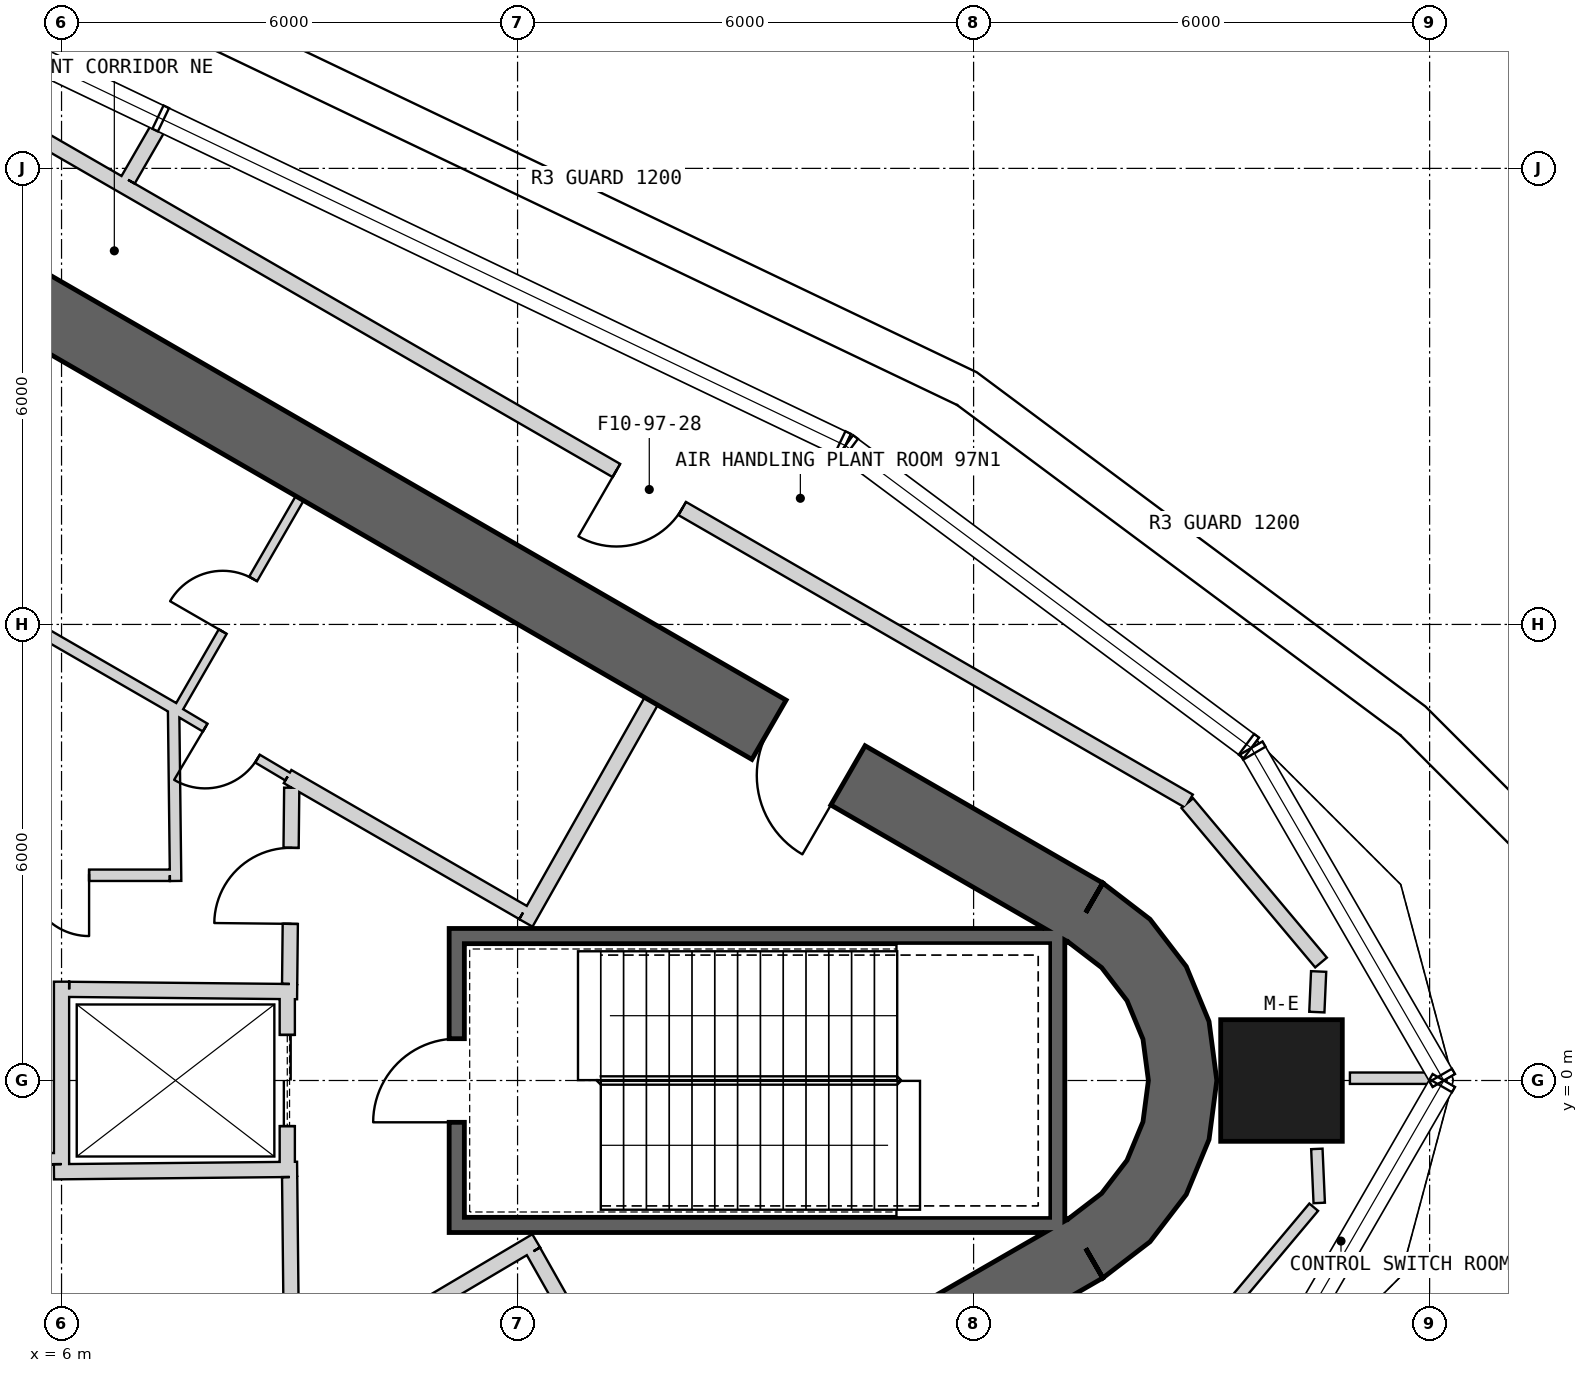
"""IFC4 building model, lengths in metres.
Left out: names, types, materials, properties, quantities, classifications, styles, units other than length and angle.
Written with IfcOpenShell. Run it as: python <this file> out.ifc"""

import sys

from ifc_helpers import new_model, si_unit, direction, frame, frame_2d, origin, origin_2d, place, context, subcontext, project, spatial, polyline, rectangle, outline, extrude, element, fill, save


model = new_model("IFC4")
c1 = context("Model", 3, precision=1e-05, world=origin(), true_north=direction((0.0, 1.0)))
c2 = subcontext(c1, "Body", "Model", "MODEL_VIEW")
j1 = project(units=[si_unit("LENGTHUNIT", "METRE"), si_unit("PLANEANGLEUNIT", "RADIAN")], contexts=[c1])
p1 = place(None, origin())
s1 = spatial("IfcSite", under=j1, at=p1, CompositionType="ELEMENT")
p2 = place(p1, origin())
s2 = spatial("IfcBuilding", under=s1, at=p2, CompositionType="ELEMENT")
p3 = place(p2, frame((0.0, 0.0, 430.3)))
s3 = spatial("IfcBuildingStorey", under=s2, at=p3, CompositionType="ELEMENT", Elevation=430.3)
p4 = place(p3, frame((22.051, 0.0, 0.0), z_axis=(0.0, 0.0, 1.0), x_axis=(1.0, 0.0, 0.0)))
e1 = element("IfcColumn", 1, at=p4, inside=s3, PredefinedType="COLUMN", context=c2, shape_type="SweptSolid", body=[
    extrude(rectangle(XDim=1.6, YDim=1.6, at=origin_2d()), origin(), (0.0, 0.0, 1.0), 5.0),
])
p5 = place(p3, frame((19.475, 2.208, 0.0), z_axis=(0.0, 0.0, 1.0), x_axis=(-0.866028369851, 0.499994862586, 0.0)))
e2 = element("IfcWall", 2, at=p5, inside=s3, PredefinedType="SHEAR", context=c2, shape_type="SweptSolid", body=[
    extrude(rectangle(XDim=31.523, YDim=0.9, at=frame_2d((15.762, 0.0))), origin(), (0.0, 0.0, 1.0), 5.0),
])
p6 = place(p5, frame((3.612, 0.0, 0.0)))
e3 = element("IfcOpeningElement", 3, at=p6, cuts=e2, PredefinedType="OPENING", context=c2, shape_type="SweptSolid", body=[
    extrude(rectangle(XDim=1.2, YDim=2.4, at=frame_2d((0.6, 1.2))), frame((0.0, 0.46, 0.0), z_axis=(0.0, -1.0, 0.0), x_axis=(1.0, 0.0, 0.0)), (0.0, 0.0, 1.0), 0.92),
])
p7 = place(p5, frame((26.712, 0.0, 0.0)))
e4 = element("IfcOpeningElement", 4, at=p7, cuts=e2, PredefinedType="OPENING", context=c2, shape_type="SweptSolid", body=[
    extrude(rectangle(XDim=1.2, YDim=2.4, at=frame_2d((0.6, 1.2))), frame((0.0, 0.46, 0.0), z_axis=(0.0, -1.0, 0.0), x_axis=(1.0, 0.0, 0.0)), (0.0, 0.0, 1.0), 0.92),
])
p8 = place(p3, frame((-7.825, -17.97, 0.0), z_axis=(0.0, 0.0, 1.0), x_axis=(0.866028369851, 0.499994862586, 0.0)))
e5 = element("IfcWall", 5, at=p8, inside=s3, PredefinedType="SHEAR", context=c2, shape_type="SweptSolid", body=[
    extrude(rectangle(XDim=31.523, YDim=0.9, at=frame_2d((15.762, 0.0))), origin(), (0.0, 0.0, 1.0), 5.0),
])
p9 = place(p8, frame((17.862, 0.0, 0.0)))
e6 = element("IfcOpeningElement", 6, at=p9, cuts=e5, PredefinedType="OPENING", context=c2, shape_type="SweptSolid", body=[
    extrude(rectangle(XDim=1.2, YDim=2.4, at=frame_2d((0.6, 1.2))), frame((0.0, 0.46, 0.0), z_axis=(0.0, -1.0, 0.0), x_axis=(1.0, 0.0, 0.0)), (0.0, 0.0, 1.0), 0.92),
])
p10 = place(p8, frame((20.562, 0.0, 0.0)))
e7 = element("IfcOpeningElement", 7, at=p10, cuts=e5, PredefinedType="OPENING", context=c2, shape_type="SweptSolid", body=[
    extrude(rectangle(XDim=1.2, YDim=2.4, at=frame_2d((0.6, 1.2))), frame((0.0, 0.46, 0.0), z_axis=(0.0, -1.0, 0.0), x_axis=(1.0, 0.0, 0.0)), (0.0, 0.0, 1.0), 0.92),
])
p11 = place(p8, frame((26.712, 0.0, 0.0)))
e8 = element("IfcOpeningElement", 8, at=p11, cuts=e5, PredefinedType="OPENING", context=c2, shape_type="SweptSolid", body=[
    extrude(rectangle(XDim=1.2, YDim=2.4, at=frame_2d((0.6, 1.2))), frame((0.0, 0.46, 0.0), z_axis=(0.0, -1.0, 0.0), x_axis=(1.0, 0.0, 0.0)), (0.0, 0.0, 1.0), 0.92),
])
p12 = place(p8, frame((3.612, 0.0, 0.0)))
e9 = element("IfcOpeningElement", 9, at=p12, cuts=e5, PredefinedType="OPENING", context=c2, shape_type="SweptSolid", body=[
    extrude(rectangle(XDim=1.2, YDim=2.4, at=frame_2d((0.6, 1.2))), frame((0.0, 0.46, 0.0), z_axis=(0.0, -1.0, 0.0), x_axis=(1.0, 0.0, 0.0)), (0.0, 0.0, 1.0), 0.92),
])
p13 = place(p3, origin())
e10 = element("IfcWall", 10, at=p13, inside=s3, PredefinedType="SHEAR", context=c2, shape_type="SweptSolid", body=[
    extrude(outline(polyline([(19.7, -2.598), (20.321, -2.121), (20.798, -1.5), (21.098, -0.777), (21.2, 0.0), (21.098, 0.777), (20.798, 1.5), (20.321, 2.121), (19.7, 2.598), (19.25, 1.819), (19.685, 1.485), (20.019, 1.05), (20.229, 0.543), (20.3, 0.0), (20.229, -0.543), (20.019, -1.05), (19.685, -1.485), (19.25, -1.819), (19.7, -2.598)])), origin(), (0.0, 0.0, 1.0), 5.0),
])
p14 = place(p3, frame((19.2, 1.9, -0.25), z_axis=(0.0, 0.0, 1.0), x_axis=(-1.0, 0.0, 0.0)))
e11 = element("IfcWall", 11, at=p14, inside=s3, PredefinedType="SHEAR", context=c2, shape_type="SweptSolid", body=[
    extrude(rectangle(XDim=8.1, YDim=0.2, at=frame_2d((4.05, 0.0))), origin(), (0.0, 0.0, 1.0), 5.0),
])
p15 = place(p3, frame((19.1, -2.0, -0.25), z_axis=(0.0, 0.0, 1.0), x_axis=(0.0, 1.0, 0.0)))
e12 = element("IfcWall", 12, at=p15, inside=s3, PredefinedType="SHEAR", context=c2, shape_type="SweptSolid", body=[
    extrude(rectangle(XDim=3.8, YDim=0.2, at=frame_2d((1.9, 0.0))), origin(), (0.0, 0.0, 1.0), 5.0),
])
p16 = place(p3, frame((11.1, -1.9, -0.25), z_axis=(0.0, 0.0, 1.0), x_axis=(1.0, 0.0, 0.0)))
e13 = element("IfcWall", 13, at=p16, inside=s3, PredefinedType="SHEAR", context=c2, shape_type="SweptSolid", body=[
    extrude(rectangle(XDim=7.9, YDim=0.2, at=frame_2d((3.95, 0.0))), origin(), (0.0, 0.0, 1.0), 5.0),
])
p17 = place(p3, frame((11.2, -1.8, -0.25), z_axis=(0.0, 0.0, 1.0), x_axis=(0.0, 1.0, 0.0)))
e14 = element("IfcWall", 14, at=p17, inside=s3, PredefinedType="SHEAR", context=c2, shape_type="SweptSolid", body=[
    extrude(rectangle(XDim=3.6, YDim=0.2, at=frame_2d((1.8, 0.0))), origin(), (0.0, 0.0, 1.0), 5.0),
])
p18 = place(p17, frame((1.25, 0.0, 0.25)))
e15 = element("IfcOpeningElement", 15, at=p18, cuts=e14, PredefinedType="OPENING", context=c2, shape_type="SweptSolid", body=[
    extrude(rectangle(XDim=1.1, YDim=2.1, at=frame_2d((0.55, 1.05))), frame((0.0, 0.11, 0.0), z_axis=(0.0, -1.0, 0.0), x_axis=(1.0, 0.0, 0.0)), (0.0, 0.0, 1.0), 0.22),
])
p19 = place(p3, frame((8.97, 1.2, 0.0), z_axis=(0.0, 0.0, 1.0), x_axis=(0.0, -1.0, 0.0)))
e16 = element("IfcWall", 16, at=p19, inside=s3, PredefinedType="PLUMBINGWALL", context=c2, shape_type="SweptSolid", body=[
    extrude(rectangle(XDim=2.4, YDim=0.2, at=frame_2d((1.2, 0.0))), origin(), (0.0, 0.0, 1.0), 4.75),
])
p20 = place(p19, frame((0.6, 0.0, 0.0)))
e17 = element("IfcOpeningElement", 17, at=p20, cuts=e16, PredefinedType="OPENING", context=c2, shape_type="SweptSolid", body=[
    extrude(rectangle(XDim=1.2, YDim=2.4, at=frame_2d((0.6, 1.2))), frame((0.0, 0.11, 0.0), z_axis=(0.0, -1.0, 0.0), x_axis=(1.0, 0.0, 0.0)), (0.0, 0.0, 1.0), 0.22),
])
p21 = place(p3, frame((9.1, -1.169, 0.0), z_axis=(0.0, 0.0, 1.0), x_axis=(-0.999950064753, -0.009993397809, 0.0)))
e18 = element("IfcWall", 18, at=p21, inside=s3, PredefinedType="PLUMBINGWALL", context=c2, shape_type="SweptSolid", body=[
    extrude(rectangle(XDim=3.2, YDim=0.2, at=frame_2d((1.6, 0.0))), origin(), (0.0, 0.0, 1.0), 4.75),
])
p22 = place(p3, frame((6.0, -1.1, 0.0), z_axis=(0.0, 0.0, 1.0), x_axis=(0.0, 1.0, 0.0)))
e19 = element("IfcWall", 19, at=p22, inside=s3, PredefinedType="PLUMBINGWALL", context=c2, shape_type="SweptSolid", body=[
    extrude(rectangle(XDim=2.4, YDim=0.2, at=frame_2d((1.2, 0.0))), origin(), (0.0, 0.0, 1.0), 4.75),
])
p23 = place(p3, frame((9.1, 1.169, 0.0), z_axis=(0.0, 0.0, 1.0), x_axis=(-0.99994990606, 0.010009264196, 0.0)))
e20 = element("IfcWall", 20, at=p23, inside=s3, PredefinedType="PLUMBINGWALL", context=c2, shape_type="SweptSolid", body=[
    extrude(rectangle(XDim=3.0, YDim=0.2, at=frame_2d((1.5, 0.0))), origin(), (0.0, 0.0, 1.0), 4.75),
])
p24 = place(p3, frame((7.508, 4.845, 0.0), z_axis=(0.0, 0.0, 1.0), x_axis=(0.500017246033, 0.866015446554, 0.0)))
e21 = element("IfcWall", 21, at=p24, inside=s3, PredefinedType="PARTITIONING", context=c2, shape_type="SweptSolid", body=[
    extrude(rectangle(XDim=3.25, YDim=0.12, at=frame_2d((1.625, 0.0))), origin(), (0.0, 0.0, 1.0), 4.75),
])
p25 = place(p24, frame((1.225, 0.0, 0.0)))
e22 = element("IfcOpeningElement", 22, at=p25, cuts=e21, PredefinedType="OPENING", context=c2, shape_type="SweptSolid", body=[
    extrude(rectangle(XDim=0.8, YDim=2.1, at=frame_2d((0.4, 1.05))), frame((0.0, 0.07, 0.0), z_axis=(0.0, -1.0, 0.0), x_axis=(1.0, 0.0, 0.0)), (0.0, 0.0, 1.0), 0.14),
])
p26 = place(p3, frame((12.11, 2.073, 0.0), z_axis=(0.0, 0.0, 1.0), x_axis=(0.49196600604, 0.870614408852, 0.0)))
e23 = element("IfcWall", 23, at=p26, inside=s3, PredefinedType="PARTITIONING", context=c2, shape_type="SweptSolid", body=[
    extrude(rectangle(XDim=3.35, YDim=0.2, at=frame_2d((1.675, 0.0))), origin(), (0.0, 0.0, 1.0), 4.75),
])
p27 = place(p3, frame((8.974, 3.999, 0.0), z_axis=(0.0, 0.0, 1.0), x_axis=(0.86601284211, -0.500021756827, 0.0)))
e24 = element("IfcWall", 24, at=p27, inside=s3, PredefinedType="PARTITIONING", context=c2, shape_type="SweptSolid", body=[
    extrude(rectangle(XDim=3.577, YDim=0.2, at=frame_2d((1.789, 0.0))), origin(), (0.0, 0.0, 1.0), 4.75),
])
p28 = place(p3, frame((7.493, 4.878, 0.0), z_axis=(0.0, 0.0, 1.0), x_axis=(0.859934455514, -0.510404479035, 0.0)))
e25 = element("IfcWall", 25, at=p28, inside=s3, PredefinedType="PARTITIONING", context=c2, shape_type="SweptSolid", body=[
    extrude(rectangle(XDim=1.722, YDim=0.12, at=frame_2d((0.861, 0.0))), origin(), (0.0, 0.0, 1.0), 4.75),
])
p29 = place(p28, frame((0.461, 0.0, 0.0)))
e26 = element("IfcOpeningElement", 26, at=p29, cuts=e25, PredefinedType="OPENING", context=c2, shape_type="SweptSolid", body=[
    extrude(rectangle(XDim=0.8, YDim=2.1, at=frame_2d((0.4, 1.05))), frame((0.0, 0.07, 0.0), z_axis=(0.0, -1.0, 0.0), x_axis=(1.0, 0.0, 0.0)), (0.0, 0.0, 1.0), 0.14),
])
p30 = place(p3, frame((7.497, 4.886, 0.0), z_axis=(0.0, 0.0, 1.0), x_axis=(-0.866030989016, 0.499990325971, 0.0)))
e27 = element("IfcWall", 27, at=p30, inside=s3, PredefinedType="PLUMBINGWALL", context=c2, shape_type="SweptSolid", body=[
    extrude(rectangle(XDim=8.1, YDim=0.15, at=frame_2d((4.05, 0.0))), origin(), (0.0, 0.0, 1.0), 4.75),
])
p31 = place(p3, frame((12.245, -2.109, 0.0), z_axis=(0.0, 0.0, 1.0), x_axis=(-0.860414880418, -0.509594185166, 0.0)))
e28 = element("IfcWall", 28, at=p31, inside=s3, PredefinedType="PARTITIONING", context=c2, shape_type="SweptSolid", body=[
    extrude(rectangle(XDim=2.7, YDim=0.2, at=frame_2d((1.35, 0.0))), origin(), (0.0, 0.0, 1.0), 4.75),
])
p32 = place(p3, frame((13.758, -4.99, 0.0), z_axis=(0.0, 0.0, 1.0), x_axis=(-0.491993409184, 0.87059892334, 0.0)))
e29 = element("IfcWall", 29, at=p32, inside=s3, PredefinedType="PARTITIONING", context=c2, shape_type="SweptSolid", body=[
    extrude(rectangle(XDim=3.15, YDim=0.2, at=frame_2d((1.575, 0.0))), origin(), (0.0, 0.0, 1.0), 4.75),
])
p33 = place(p32, frame((1.175, 0.0, 0.0)))
e30 = element("IfcOpeningElement", 30, at=p33, cuts=e29, PredefinedType="OPENING", context=c2, shape_type="SweptSolid", body=[
    extrude(rectangle(XDim=0.8, YDim=2.1, at=frame_2d((0.4, 1.05))), frame((0.0, 0.11, 0.0), z_axis=(0.0, -1.0, 0.0), x_axis=(1.0, 0.0, 0.0)), (0.0, 0.0, 1.0), 0.22),
])
p34 = place(p3, frame((9.029, -3.851, 0.0), z_axis=(0.0, 0.0, 1.0), x_axis=(-0.010784614026, 0.999941844359, 0.0)))
e31 = element("IfcWall", 31, at=p34, inside=s3, PredefinedType="PARTITIONING", context=c2, shape_type="SweptSolid", body=[
    extrude(rectangle(XDim=2.581, YDim=0.2, at=frame_2d((1.291, 0.0))), origin(), (0.0, 0.0, 1.0), 4.75),
])
p35 = place(p3, frame((9.001, 1.27, 0.0), z_axis=(0.0, 0.0, 1.0), x_axis=(0.010780534828, 0.999941888346, 0.0)))
e32 = element("IfcWall", 32, at=p35, inside=s3, PredefinedType="PARTITIONING", context=c2, shape_type="SweptSolid", body=[
    extrude(rectangle(XDim=2.582, YDim=0.2, at=frame_2d((1.291, 0.0))), origin(), (0.0, 0.0, 1.0), 4.75),
])
p36 = place(p35, frame((0.791, 0.0, 0.0)))
e33 = element("IfcOpeningElement", 33, at=p36, cuts=e32, PredefinedType="OPENING", context=c2, shape_type="SweptSolid", body=[
    extrude(rectangle(XDim=1.0, YDim=2.1, at=frame_2d((0.5, 1.05))), frame((0.0, 0.11, 0.0), z_axis=(0.0, -1.0, 0.0), x_axis=(1.0, 0.0, 0.0)), (0.0, 0.0, 1.0), 0.22),
])
p37 = place(p3, frame((5.9, -1.03, 0.0), z_axis=(0.0, 0.0, 1.0), x_axis=(-1.0, 0.0, 0.0)))
e34 = element("IfcWall", 34, at=p37, inside=s3, PredefinedType="PLUMBINGWALL", context=c2, shape_type="SweptSolid", body=[
    extrude(rectangle(XDim=0.4, YDim=0.15, at=frame_2d((0.2, 0.0))), origin(), (0.0, 0.0, 1.0), 4.75),
])
p38 = place(p3, frame((7.501, 2.625, 0.0), z_axis=(0.0, 0.0, 1.0), x_axis=(-0.01177286769, 0.999930697392, 0.0)))
e35 = element("IfcWall", 35, at=p38, inside=s3, PredefinedType="PLUMBINGWALL", context=c2, shape_type="SweptSolid", body=[
    extrude(rectangle(XDim=2.24, YDim=0.15, at=frame_2d((1.12, 0.0))), origin(), (0.0, 0.0, 1.0), 4.75),
])
p39 = place(p3, frame((4.425, 2.7, 0.0), z_axis=(0.0, 0.0, 1.0), x_axis=(1.0, 0.0, 0.0)))
e36 = element("IfcWall", 36, at=p39, inside=s3, PredefinedType="PLUMBINGWALL", context=c2, shape_type="SweptSolid", body=[
    extrude(rectangle(XDim=3.0, YDim=0.15, at=frame_2d((1.5, 0.0))), origin(), (0.0, 0.0, 1.0), 4.75),
])
p40 = place(p39, frame((1.137, 0.0, 0.0)))
e37 = element("IfcOpeningElement", 37, at=p40, cuts=e36, PredefinedType="OPENING", context=c2, shape_type="SweptSolid", body=[
    extrude(rectangle(XDim=0.8, YDim=2.1, at=frame_2d((0.4, 1.05))), frame((0.0, 0.085, 0.0), z_axis=(0.0, -1.0, 0.0), x_axis=(1.0, 0.0, 0.0)), (0.0, 0.0, 1.0), 0.17),
])
p41 = place(p3, frame((20.834, 3.675, 0.0), z_axis=(0.0, 0.0, 1.0), x_axis=(-0.866028536494, 0.499994573949, 0.0)))
e38 = element("IfcWall", 38, at=p41, inside=s3, PredefinedType="PARTITIONING", context=c2, shape_type="SweptSolid", body=[
    extrude(rectangle(XDim=32.411, YDim=0.2, at=frame_2d((16.206, 0.0))), origin(), (0.0, 0.0, 1.0), 4.75),
])
p42 = place(p41, frame((7.7, 0.0, 0.0)))
e39 = element("IfcOpeningElement", 39, at=p42, cuts=e38, PredefinedType="OPENING", context=c2, shape_type="SweptSolid", body=[
    extrude(rectangle(XDim=1.0, YDim=2.1, at=frame_2d((0.5, 1.05))), frame((0.0, 0.11, 0.0), z_axis=(0.0, -1.0, 0.0), x_axis=(1.0, 0.0, 0.0)), (0.0, 0.0, 1.0), 0.22),
])
p43 = place(p41, frame((18.006, 0.0, 0.0)))
e40 = element("IfcOpeningElement", 40, at=p43, cuts=e38, PredefinedType="OPENING", context=c2, shape_type="SweptSolid", body=[
    extrude(rectangle(XDim=1.0, YDim=2.1, at=frame_2d((0.5, 1.05))), frame((0.0, 0.11, 0.0), z_axis=(0.0, -1.0, 0.0), x_axis=(1.0, 0.0, 0.0)), (0.0, 0.0, 1.0), 0.22),
])
p44 = place(p3, frame((22.571, 1.552, 0.0), z_axis=(0.0, 0.0, 1.0), x_axis=(-0.642777788023, 0.766052684366, 0.0)))
e41 = element("IfcWall", 41, at=p44, inside=s3, PredefinedType="PARTITIONING", context=c2, shape_type="SweptSolid", body=[
    extrude(rectangle(XDim=2.737, YDim=0.2, at=frame_2d((1.369, 0.0))), origin(), (0.0, 0.0, 1.0), 4.75),
])
p45 = place(p3, frame((22.516, 0.9, 0.0), z_axis=(0.0, 0.0, 1.0), x_axis=(0.044289222506, 0.99901875096, 0.0)))
e42 = element("IfcWall", 42, at=p45, inside=s3, PredefinedType="PARTITIONING", context=c2, shape_type="SweptSolid", body=[
    extrude(rectangle(XDim=0.535, YDim=0.2, at=frame_2d((0.267, 0.0))), origin(), (0.0, 0.0, 1.0), 4.75),
])
p46 = place(p3, frame((7.271, 12.534, 0.0), z_axis=(0.0, 0.0, 1.0), x_axis=(-0.500025443912, -0.866010713236, 0.0)))
e43 = element("IfcWall", 43, at=p46, inside=s3, PredefinedType="PARTITIONING", context=c2, shape_type="SweptSolid", body=[
    extrude(rectangle(XDim=0.791, YDim=0.2, at=frame_2d((0.395, 0.0))), origin(), (0.0, 0.0, 1.0), 4.75),
])
p47 = place(p3, frame((22.951, 0.03, 0.0), z_axis=(0.0, 0.0, 1.0), x_axis=(1.0, 0.0, 0.0)))
e44 = element("IfcWall", 44, at=p47, inside=s3, PredefinedType="PLUMBINGWALL", context=c2, shape_type="SweptSolid", body=[
    extrude(rectangle(XDim=1.098, YDim=0.15, at=frame_2d((0.549, 0.0))), origin(), (0.0, 0.0, 1.0), 3.93),
])
p48 = place(p3, frame((22.548, -1.611, 0.0), z_axis=(0.0, 0.0, 1.0), x_axis=(-0.044240884026, 0.999020892765, 0.0)))
e45 = element("IfcWall", 45, at=p48, inside=s3, PredefinedType="PLUMBINGWALL", context=c2, shape_type="SweptSolid", body=[
    extrude(rectangle(XDim=0.712, YDim=0.15, at=frame_2d((0.356, 0.0))), origin(), (0.0, 0.0, 1.0), 4.75),
])
p49 = place(p3, frame((20.699, -3.783, 0.0), z_axis=(0.0, 0.0, 1.0), x_axis=(0.642806418139, 0.76602866056, 0.0)))
e46 = element("IfcWall", 46, at=p49, inside=s3, PredefinedType="PLUMBINGWALL", context=c2, shape_type="SweptSolid", body=[
    extrude(rectangle(XDim=2.762, YDim=0.15, at=frame_2d((1.381, 0.0))), origin(), (0.0, 0.0, 1.0), 4.75),
])
p50 = place(p18, origin())
e47 = element("IfcDoor", 47, at=p50, inside=s3, OperationType="SINGLE_SWING_LEFT", PredefinedType="USERDEFINED", context=c2, shape_type="SweptSolid", body=[
    extrude(rectangle(XDim=1.1, YDim=2.1, at=frame_2d((0.55, 1.05))), frame((0.0, 0.025, 0.0), z_axis=(0.0, -1.0, 0.0), x_axis=(1.0, 0.0, 0.0)), (0.0, 0.0, 1.0), 0.05),
])
fill(e15, e47)
p51 = place(p36, origin())
e48 = element("IfcDoor", 48, at=p51, inside=s3, OperationType="SINGLE_SWING_LEFT", PredefinedType="USERDEFINED", context=c2, shape_type="SweptSolid", body=[
    extrude(rectangle(XDim=1.0, YDim=2.1, at=frame_2d((0.5, 1.05))), frame((0.0, 0.025, 0.0), z_axis=(0.0, -1.0, 0.0), x_axis=(1.0, 0.0, 0.0)), (0.0, 0.0, 1.0), 0.05),
])
fill(e33, e48)
p52 = place(p20, origin())
e49 = element("IfcDoor", 49, at=p52, inside=s3, OperationType="SLIDING_TO_LEFT", PredefinedType="USERDEFINED", context=c2, shape_type="SweptSolid", body=[
    extrude(rectangle(XDim=1.2, YDim=2.4, at=frame_2d((0.6, 1.2))), frame((0.0, 0.025, 0.0), z_axis=(0.0, -1.0, 0.0), x_axis=(1.0, 0.0, 0.0)), (0.0, 0.0, 1.0), 0.05),
])
fill(e17, e49)
p53 = place(p40, origin())
e50 = element("IfcDoor", 50, at=p53, inside=s3, OperationType="SINGLE_SWING_RIGHT", PredefinedType="USERDEFINED", context=c2, shape_type="SweptSolid", body=[
    extrude(rectangle(XDim=0.8, YDim=2.1, at=frame_2d((0.4, 1.05))), frame((0.0, 0.025, 0.0), z_axis=(0.0, -1.0, 0.0), x_axis=(1.0, 0.0, 0.0)), (0.0, 0.0, 1.0), 0.05),
])
fill(e37, e50)
p54 = place(p29, origin())
e51 = element("IfcDoor", 51, at=p54, inside=s3, OperationType="SINGLE_SWING_LEFT", PredefinedType="USERDEFINED", context=c2, shape_type="SweptSolid", body=[
    extrude(rectangle(XDim=0.8, YDim=2.1, at=frame_2d((0.4, 1.05))), frame((0.0, 0.025, 0.0), z_axis=(0.0, -1.0, 0.0), x_axis=(1.0, 0.0, 0.0)), (0.0, 0.0, 1.0), 0.05),
])
fill(e26, e51)
p55 = place(p25, origin())
e52 = element("IfcDoor", 52, at=p55, inside=s3, OperationType="SINGLE_SWING_LEFT", PredefinedType="USERDEFINED", context=c2, shape_type="SweptSolid", body=[
    extrude(rectangle(XDim=0.8, YDim=2.1, at=frame_2d((0.4, 1.05))), frame((0.0, 0.025, 0.0), z_axis=(0.0, -1.0, 0.0), x_axis=(1.0, 0.0, 0.0)), (0.0, 0.0, 1.0), 0.05),
])
fill(e22, e52)
p56 = place(p42, origin())
e53 = element("IfcDoor", 53, at=p56, inside=s3, OperationType="SINGLE_SWING_RIGHT", PredefinedType="USERDEFINED", context=c2, shape_type="SweptSolid", body=[
    extrude(rectangle(XDim=1.0, YDim=2.1, at=frame_2d((0.5, 1.05))), frame((0.0, 0.025, 0.0), z_axis=(0.0, -1.0, 0.0), x_axis=(1.0, 0.0, 0.0)), (0.0, 0.0, 1.0), 0.05),
])
fill(e39, e53)
p57 = place(p6, origin())
e54 = element("IfcDoor", 54, at=p57, inside=s3, OperationType="SINGLE_SWING_LEFT", PredefinedType="USERDEFINED", context=c2, shape_type="SweptSolid", body=[
    extrude(rectangle(XDim=1.2, YDim=2.4, at=frame_2d((0.6, 1.2))), frame((0.0, 0.025, 0.0), z_axis=(0.0, -1.0, 0.0), x_axis=(1.0, 0.0, 0.0)), (0.0, 0.0, 1.0), 0.05),
])
fill(e3, e54)
save(model, sys.argv[1])
